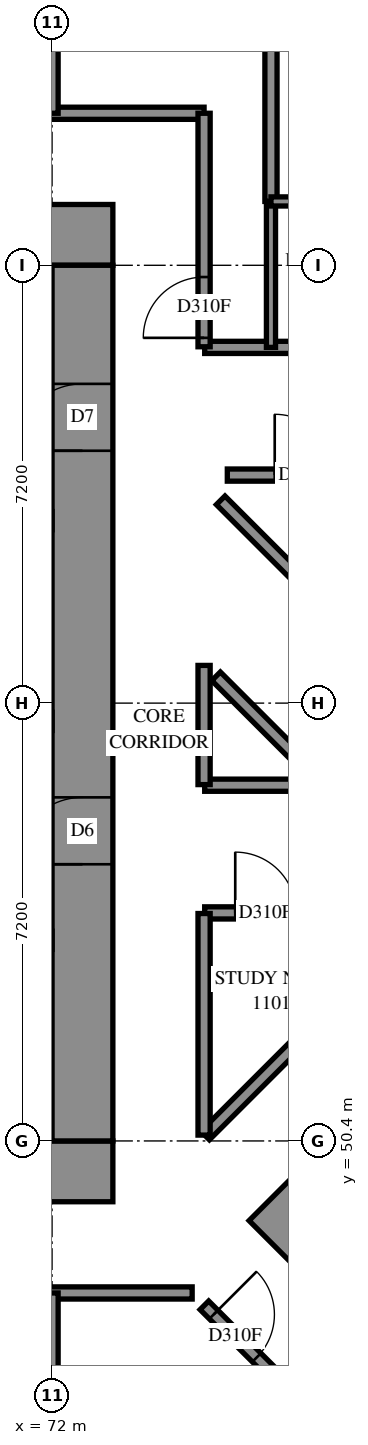
"""IFC4 building model, lengths in metres.
Left out: names, types, materials, properties, quantities, classifications, styles, units other than length and angle.
Written with IfcOpenShell. Run it as: python <this file> out.ifc"""

import sys

from ifc_helpers import new_model, si_unit, direction, frame, frame_2d, origin, place, context, subcontext, project, spatial, rectangle, extrude, element, fill, save


model = new_model("IFC4")
c1 = context("Model", 3, precision=1e-05, world=origin(), true_north=direction((0.0, 1.0)))
c2 = subcontext(c1, "Body", "Model", "MODEL_VIEW")
j1 = project(units=[si_unit("LENGTHUNIT", "METRE"), si_unit("PLANEANGLEUNIT", "RADIAN")], contexts=[c1])
p1 = place(None, origin())
s1 = spatial("IfcSite", under=j1, at=p1, CompositionType="ELEMENT")
p2 = place(p1, origin())
s2 = spatial("IfcBuilding", under=s1, at=p2, CompositionType="ELEMENT")
p3 = place(p2, frame((0.0, 0.0, 44.0)))
s3 = spatial("IfcBuildingStorey", under=s2, at=p3, CompositionType="ELEMENT", Elevation=44.0)
p4 = place(p3, frame((56.6, 49.9, -0.3), z_axis=(0.0, 0.0, 1.0), x_axis=(1.0, 0.0, 0.0)))
e1 = element("IfcWall", 1, at=p4, inside=s3, PredefinedType="SHEAR", context=c2, shape_type="SweptSolid", body=[
    extrude(rectangle(XDim=16.4, YDim=1.0, at=frame_2d((8.2, 0.0))), origin(), (0.0, 0.0, 1.0), 2.7),
])
p5 = place(p3, frame((56.6, 65.3, -0.3), z_axis=(0.0, 0.0, 1.0), x_axis=(1.0, 0.0, 0.0)))
e2 = element("IfcWall", 2, at=p5, inside=s3, PredefinedType="SHEAR", context=c2, shape_type="SweptSolid", body=[
    extrude(rectangle(XDim=16.4, YDim=1.0, at=frame_2d((8.2, 0.0))), origin(), (0.0, 0.0, 1.0), 2.7),
])
p6 = place(p5, frame((11.0, 0.0, 0.3)))
e3 = element("IfcOpeningElement", 3, at=p6, cuts=e2, PredefinedType="OPENING", context=c2, shape_type="SweptSolid", body=[
    extrude(rectangle(XDim=0.8, YDim=2.1, at=frame_2d((0.4, 1.05))), frame((0.0, 0.51, 0.0), z_axis=(0.0, -1.0, 0.0), x_axis=(1.0, 0.0, 0.0)), (0.0, 0.0, 1.0), 1.02),
])
p7 = place(p3, frame((72.5, 50.4, -0.3), z_axis=(0.0, 0.0, 1.0), x_axis=(0.0, 1.0, 0.0)))
e4 = element("IfcWall", 4, at=p7, inside=s3, PredefinedType="SHEAR", context=c2, shape_type="SweptSolid", body=[
    extrude(rectangle(XDim=14.4, YDim=1.0, at=frame_2d((7.2, 0.0))), origin(), (0.0, 0.0, 1.0), 2.7),
])
p8 = place(p7, frame((4.55, 0.0, 0.3)))
e5 = element("IfcOpeningElement", 5, at=p8, cuts=e4, PredefinedType="OPENING", context=c2, shape_type="SweptSolid", body=[
    extrude(rectangle(XDim=1.1, YDim=2.1, at=frame_2d((0.55, 1.05))), frame((0.0, 0.51, 0.0), z_axis=(0.0, -1.0, 0.0), x_axis=(1.0, 0.0, 0.0)), (0.0, 0.0, 1.0), 1.02),
])
p9 = place(p7, frame((11.35, 0.0, 0.3)))
e6 = element("IfcOpeningElement", 6, at=p9, cuts=e4, PredefinedType="OPENING", context=c2, shape_type="SweptSolid", body=[
    extrude(rectangle(XDim=1.1, YDim=2.1, at=frame_2d((0.55, 1.05))), frame((0.0, 0.51, 0.0), z_axis=(0.0, -1.0, 0.0), x_axis=(1.0, 0.0, 0.0)), (0.0, 0.0, 1.0), 1.02),
])
p10 = place(p3, frame((75.594, 49.443, -0.3), z_axis=(0.0, 0.0, 1.0), x_axis=(0.7071037324, -0.70710983, 0.0)))
e7 = element("IfcWall", 7, at=p10, inside=s3, PredefinedType="SHEAR", context=c2, shape_type="SweptSolid", body=[
    extrude(rectangle(XDim=16.4, YDim=1.0, at=frame_2d((8.2, 0.0))), origin(), (0.0, 0.0, 1.0), 2.7),
])
p11 = place(p3, frame((55.1, 67.3, 0.0), z_axis=(0.0, 0.0, 1.0), x_axis=(1.0, 0.0, 0.0)))
e8 = element("IfcWall", 8, at=p11, inside=s3, PredefinedType="PARTITIONING", context=c2, shape_type="SweptSolid", body=[
    extrude(rectangle(XDim=19.4, YDim=0.2, at=frame_2d((9.7, 0.0))), origin(), (0.0, 0.0, 1.0), 3.1),
])
p12 = place(p11, frame((6.399, 0.0, 0.0)))
e9 = element("IfcOpeningElement", 9, at=p12, cuts=e8, PredefinedType="OPENING", context=c2, shape_type="SweptSolid", body=[
    extrude(rectangle(XDim=0.9, YDim=2.1, at=frame_2d((0.45, 1.05))), frame((0.0, 0.11, 0.0), z_axis=(0.0, -1.0, 0.0), x_axis=(1.0, 0.0, 0.0)), (0.0, 0.0, 1.0), 0.22),
])
p13 = place(p11, frame((13.599, 0.0, 0.0)))
e10 = element("IfcOpeningElement", 10, at=p13, cuts=e8, PredefinedType="OPENING", context=c2, shape_type="SweptSolid", body=[
    extrude(rectangle(XDim=0.9, YDim=2.1, at=frame_2d((0.45, 1.05))), frame((0.0, 0.11, 0.0), z_axis=(0.0, -1.0, 0.0), x_axis=(1.0, 0.0, 0.0)), (0.0, 0.0, 1.0), 0.22),
])
p14 = place(p3, frame((55.1, 47.9, 0.0), z_axis=(0.0, 0.0, 1.0), x_axis=(1.0, 0.0, 0.0)))
e11 = element("IfcWall", 11, at=p14, inside=s3, PredefinedType="PARTITIONING", context=c2, shape_type="SweptSolid", body=[
    extrude(rectangle(XDim=19.204, YDim=0.2, at=frame_2d((9.602, 0.0))), origin(), (0.0, 0.0, 1.0), 3.1),
])
p15 = place(p14, frame((6.399, 0.0, 0.0)))
e12 = element("IfcOpeningElement", 12, at=p15, cuts=e11, PredefinedType="OPENING", context=c2, shape_type="SweptSolid", body=[
    extrude(rectangle(XDim=0.9, YDim=2.1, at=frame_2d((0.45, 1.05))), frame((0.0, 0.11, 0.0), z_axis=(0.0, -1.0, 0.0), x_axis=(1.0, 0.0, 0.0)), (0.0, 0.0, 1.0), 0.22),
])
p16 = place(p14, frame((13.599, 0.0, 0.0)))
e13 = element("IfcOpeningElement", 13, at=p16, cuts=e11, PredefinedType="OPENING", context=c2, shape_type="SweptSolid", body=[
    extrude(rectangle(XDim=0.9, YDim=2.1, at=frame_2d((0.45, 1.05))), frame((0.0, 0.11, 0.0), z_axis=(0.0, -1.0, 0.0), x_axis=(1.0, 0.0, 0.0)), (0.0, 0.0, 1.0), 0.22),
])
p17 = place(p3, frame((75.6, 65.85, 0.0), z_axis=(0.0, 0.0, 1.0), x_axis=(0.0, 1.0, 0.0)))
e14 = element("IfcWall", 14, at=p17, inside=s3, PredefinedType="PARTITIONING", context=c2, shape_type="SweptSolid", body=[
    extrude(rectangle(XDim=6.883, YDim=0.2, at=frame_2d((3.442, 0.0))), origin(), (0.0, 0.0, 1.0), 3.1),
])
p18 = place(p3, frame((74.773, 60.935, 0.0), z_axis=(0.0, 0.0, 1.0), x_axis=(0.7071067812, -0.7071067812, 0.0)))
e15 = element("IfcWall", 15, at=p18, inside=s3, PredefinedType="PARTITIONING", context=c2, shape_type="SweptSolid", body=[
    extrude(rectangle(XDim=5.408, YDim=0.2, at=frame_2d((2.704, 0.0))), origin(), (0.0, 0.0, 1.0), 3.1),
])
p19 = place(p3, frame((74.517, 50.489, 0.0), z_axis=(0.0, 0.0, 1.0), x_axis=(0.7071067812, 0.7071067812, 0.0)))
e16 = element("IfcWall", 16, at=p19, inside=s3, PredefinedType="PARTITIONING", context=c2, shape_type="SweptSolid", body=[
    extrude(rectangle(XDim=5.176, YDim=0.2, at=frame_2d((2.588, 0.0))), origin(), (0.0, 0.0, 1.0), 3.1),
])
p20 = place(p3, frame((74.51, 63.45, 0.0), z_axis=(0.0, 0.0, 1.0), x_axis=(1.0, 0.0, 0.0)))
e17 = element("IfcWall", 17, at=p20, inside=s3, PredefinedType="PARTITIONING", context=c2, shape_type="SweptSolid", body=[
    extrude(rectangle(XDim=4.69, YDim=0.2, at=frame_2d((2.345, 0.0))), origin(), (0.0, 0.0, 1.0), 3.1),
])
p21 = place(p20, frame((3.12, 0.0, 0.0)))
e18 = element("IfcOpeningElement", 18, at=p21, cuts=e17, PredefinedType="OPENING", context=c2, shape_type="SweptSolid", body=[
    extrude(rectangle(XDim=0.9, YDim=2.1, at=frame_2d((0.45, 1.05))), frame((0.0, 0.11, 0.0), z_axis=(0.0, -1.0, 0.0), x_axis=(1.0, 0.0, 0.0)), (0.0, 0.0, 1.0), 0.22),
])
p22 = place(p3, frame((74.882, 61.35, 0.0), z_axis=(0.0, 0.0, 1.0), x_axis=(1.0, 0.0, 0.0)))
e19 = element("IfcWall", 19, at=p22, inside=s3, PredefinedType="PARTITIONING", context=c2, shape_type="SweptSolid", body=[
    extrude(rectangle(XDim=4.318, YDim=0.2, at=frame_2d((2.159, 0.0))), origin(), (0.0, 0.0, 1.0), 3.1),
])
p23 = place(p22, frame((0.78, 0.0, 0.0)))
e20 = element("IfcOpeningElement", 20, at=p23, cuts=e19, PredefinedType="OPENING", context=c2, shape_type="SweptSolid", body=[
    extrude(rectangle(XDim=1.0, YDim=2.1, at=frame_2d((0.5, 1.05))), frame((0.0, 0.11, 0.0), z_axis=(0.0, -1.0, 0.0), x_axis=(1.0, 0.0, 0.0)), (0.0, 0.0, 1.0), 0.22),
])
for number, where, z_axis, x_axis in (
    (21, (72.0, 67.3, 0.0), (0.0, 0.0, 1.0), (0.0, 1.0, 0.0)),
    (22, (72.0, 43.8, 0.0), (0.0, 0.0, 1.0), (0.0, 1.0, 0.0)),
):
    element("IfcWall", number, at=place(p3, frame(where, z_axis=z_axis, x_axis=x_axis)), inside=s3, PredefinedType="PARTITIONING", context=c2, shape_type="SweptSolid", body=[
        extrude(rectangle(XDim=4.1, YDim=0.2, at=frame_2d((2.05, 0.0))), origin(), (0.0, 0.0, 1.0), 3.1),
    ])
p24 = place(p3, frame((74.505, 47.697, 0.0), z_axis=(0.0, 0.0, 1.0), x_axis=(0.7071067812, -0.7071067812, 0.0)))
e23 = element("IfcWall", 23, at=p24, inside=s3, PredefinedType="PARTITIONING", context=c2, shape_type="SweptSolid", body=[
    extrude(rectangle(XDim=4.019, YDim=0.2, at=frame_2d((2.01, 0.0))), origin(), (0.0, 0.0, 1.0), 3.1),
])
p25 = place(p24, frame((0.215, 0.0, 0.0)))
e24 = element("IfcOpeningElement", 24, at=p25, cuts=e23, PredefinedType="OPENING", context=c2, shape_type="SweptSolid", body=[
    extrude(rectangle(XDim=1.0, YDim=2.1, at=frame_2d((0.5, 1.05))), frame((0.0, 0.11, 0.0), z_axis=(0.0, -1.0, 0.0), x_axis=(1.0, 0.0, 0.0)), (0.0, 0.0, 1.0), 0.22),
])
p26 = place(p3, frame((74.5, 63.46, 0.0), z_axis=(0.0, 0.0, 1.0), x_axis=(0.0, 1.0, 0.0)))
e25 = element("IfcWall", 25, at=p26, inside=s3, PredefinedType="PARTITIONING", context=c2, shape_type="SweptSolid", body=[
    extrude(rectangle(XDim=3.84, YDim=0.2, at=frame_2d((1.92, 0.0))), origin(), (0.0, 0.0, 1.0), 3.1),
])
p27 = place(p26, frame((0.147, 0.0, 0.0)))
e26 = element("IfcOpeningElement", 26, at=p27, cuts=e25, PredefinedType="OPENING", context=c2, shape_type="SweptSolid", body=[
    extrude(rectangle(XDim=1.0, YDim=2.1, at=frame_2d((0.5, 1.05))), frame((0.0, 0.11, 0.0), z_axis=(0.0, -1.0, 0.0), x_axis=(1.0, 0.0, 0.0)), (0.0, 0.0, 1.0), 0.22),
])
p28 = place(p3, frame((74.51, 54.15, 0.0), z_axis=(0.0, 0.0, 1.0), x_axis=(1.0, 0.0, 0.0)))
e27 = element("IfcWall", 27, at=p28, inside=s3, PredefinedType="PARTITIONING", context=c2, shape_type="SweptSolid", body=[
    extrude(rectangle(XDim=3.666, YDim=0.2, at=frame_2d((1.833, 0.0))), origin(), (0.0, 0.0, 1.0), 3.1),
])
p29 = place(p28, frame((0.502, 0.0, 0.0)))
e28 = element("IfcOpeningElement", 28, at=p29, cuts=e27, PredefinedType="OPENING", context=c2, shape_type="SweptSolid", body=[
    extrude(rectangle(XDim=1.0, YDim=2.1, at=frame_2d((0.5, 1.05))), frame((0.0, 0.11, 0.0), z_axis=(0.0, -1.0, 0.0), x_axis=(1.0, 0.0, 0.0)), (0.0, 0.0, 1.0), 0.22),
])
p30 = place(p3, frame((74.5, 50.496, 0.0), z_axis=(0.0, 0.0, 1.0), x_axis=(0.0, 1.0, 0.0)))
e29 = element("IfcWall", 29, at=p30, inside=s3, PredefinedType="PARTITIONING", context=c2, shape_type="SweptSolid", body=[
    extrude(rectangle(XDim=3.644, YDim=0.2, at=frame_2d((1.822, 0.0))), origin(), (0.0, 0.0, 1.0), 3.1),
])
p31 = place(p3, frame((74.697, 58.041, 0.0), z_axis=(0.0, 0.0, 1.0), x_axis=(0.7071067812, -0.7071067812, 0.0)))
e30 = element("IfcWall", 30, at=p31, inside=s3, PredefinedType="PARTITIONING", context=c2, shape_type="SweptSolid", body=[
    extrude(rectangle(XDim=2.534, YDim=0.2, at=frame_2d((1.267, 0.0))), origin(), (0.0, 0.0, 1.0), 3.1),
])
p32 = place(p3, frame((75.6, 63.45, 0.0), z_axis=(0.0, 0.0, 1.0), x_axis=(0.0, 1.0, 0.0)))
e31 = element("IfcWall", 31, at=p32, inside=s3, PredefinedType="PARTITIONING", context=c2, shape_type="SweptSolid", body=[
    extrude(rectangle(XDim=2.4, YDim=0.15, at=frame_2d((1.2, 0.0))), origin(), (0.0, 0.0, 1.0), 3.1),
])
p33 = place(p3, frame((74.51, 56.25, 0.0), z_axis=(0.0, 0.0, 1.0), x_axis=(1.0, 0.0, 0.0)))
e32 = element("IfcWall", 32, at=p33, inside=s3, PredefinedType="PARTITIONING", context=c2, shape_type="SweptSolid", body=[
    extrude(rectangle(XDim=1.982, YDim=0.2, at=frame_2d((0.991, 0.0))), origin(), (0.0, 0.0, 1.0), 3.1),
])
p34 = place(p3, frame((74.5, 56.26, 0.0), z_axis=(0.0, 0.0, 1.0), x_axis=(0.0, 1.0, 0.0)))
e33 = element("IfcWall", 33, at=p34, inside=s3, PredefinedType="PARTITIONING", context=c2, shape_type="SweptSolid", body=[
    extrude(rectangle(XDim=1.96, YDim=0.2, at=frame_2d((0.98, 0.0))), origin(), (0.0, 0.0, 1.0), 3.1),
])
p35 = place(p3, frame((75.6, 65.85, 0.0), z_axis=(0.0, 0.0, 1.0), x_axis=(1.0, 0.0, 0.0)))
e34 = element("IfcWall", 34, at=p35, inside=s3, PredefinedType="PARTITIONING", context=c2, shape_type="SweptSolid", body=[
    extrude(rectangle(XDim=1.9, YDim=0.15, at=frame_2d((0.95, 0.0))), origin(), (0.0, 0.0, 1.0), 3.1),
])
p36 = place(p35, frame((0.607, 0.0, 0.0)))
e35 = element("IfcOpeningElement", 35, at=p36, cuts=e34, PredefinedType="OPENING", context=c2, shape_type="SweptSolid", body=[
    extrude(rectangle(XDim=0.8, YDim=2.1, at=frame_2d((0.4, 1.05))), frame((0.0, 0.085, 0.0), z_axis=(0.0, -1.0, 0.0), x_axis=(1.0, 0.0, 0.0)), (0.0, 0.0, 1.0), 0.17),
])
p37 = place(p8, origin())
e36 = element("IfcDoor", 36, at=p37, inside=s3, OperationType="DOUBLE_DOOR_SINGLE_SWING", PredefinedType="DOOR", context=c2, shape_type="SweptSolid", body=[
    extrude(rectangle(XDim=1.1, YDim=2.1, at=frame_2d((0.55, 1.05))), frame((0.0, 0.025, 0.0), z_axis=(0.0, -1.0, 0.0), x_axis=(1.0, 0.0, 0.0)), (0.0, 0.0, 1.0), 0.05),
])
fill(e5, e36)
p38 = place(p9, origin())
e37 = element("IfcDoor", 37, at=p38, inside=s3, OperationType="SINGLE_SWING_RIGHT", PredefinedType="DOOR", context=c2, shape_type="SweptSolid", body=[
    extrude(rectangle(XDim=1.1, YDim=2.1, at=frame_2d((0.55, 1.05))), frame((0.0, 0.025, 0.0), z_axis=(0.0, -1.0, 0.0), x_axis=(1.0, 0.0, 0.0)), (0.0, 0.0, 1.0), 0.05),
])
fill(e6, e37)
p39 = place(p29, origin())
e38 = element("IfcDoor", 38, at=p39, inside=s3, OperationType="SINGLE_SWING_RIGHT", PredefinedType="DOOR", context=c2, shape_type="SweptSolid", body=[
    extrude(rectangle(XDim=1.0, YDim=2.1, at=frame_2d((0.5, 1.05))), frame((0.0, 0.025, 0.0), z_axis=(0.0, -1.0, 0.0), x_axis=(1.0, 0.0, 0.0)), (0.0, 0.0, 1.0), 0.05),
])
fill(e28, e38)
p40 = place(p27, origin())
e39 = element("IfcDoor", 39, at=p40, inside=s3, OperationType="SINGLE_SWING_RIGHT", PredefinedType="DOOR", context=c2, shape_type="SweptSolid", body=[
    extrude(rectangle(XDim=1.0, YDim=2.1, at=frame_2d((0.5, 1.05))), frame((0.0, 0.025, 0.0), z_axis=(0.0, -1.0, 0.0), x_axis=(1.0, 0.0, 0.0)), (0.0, 0.0, 1.0), 0.05),
])
fill(e26, e39)
p41 = place(p25, origin())
e40 = element("IfcDoor", 40, at=p41, inside=s3, OperationType="SINGLE_SWING_LEFT", PredefinedType="DOOR", context=c2, shape_type="SweptSolid", body=[
    extrude(rectangle(XDim=1.0, YDim=2.1, at=frame_2d((0.5, 1.05))), frame((0.0, 0.025, 0.0), z_axis=(0.0, -1.0, 0.0), x_axis=(1.0, 0.0, 0.0)), (0.0, 0.0, 1.0), 0.05),
])
fill(e24, e40)
p42 = place(p23, origin())
e41 = element("IfcDoor", 41, at=p42, inside=s3, OperationType="SINGLE_SWING_RIGHT", PredefinedType="DOOR", context=c2, shape_type="SweptSolid", body=[
    extrude(rectangle(XDim=1.0, YDim=2.1, at=frame_2d((0.5, 1.05))), frame((0.0, 0.025, 0.0), z_axis=(0.0, -1.0, 0.0), x_axis=(1.0, 0.0, 0.0)), (0.0, 0.0, 1.0), 0.05),
])
fill(e20, e41)
save(model, sys.argv[1])
